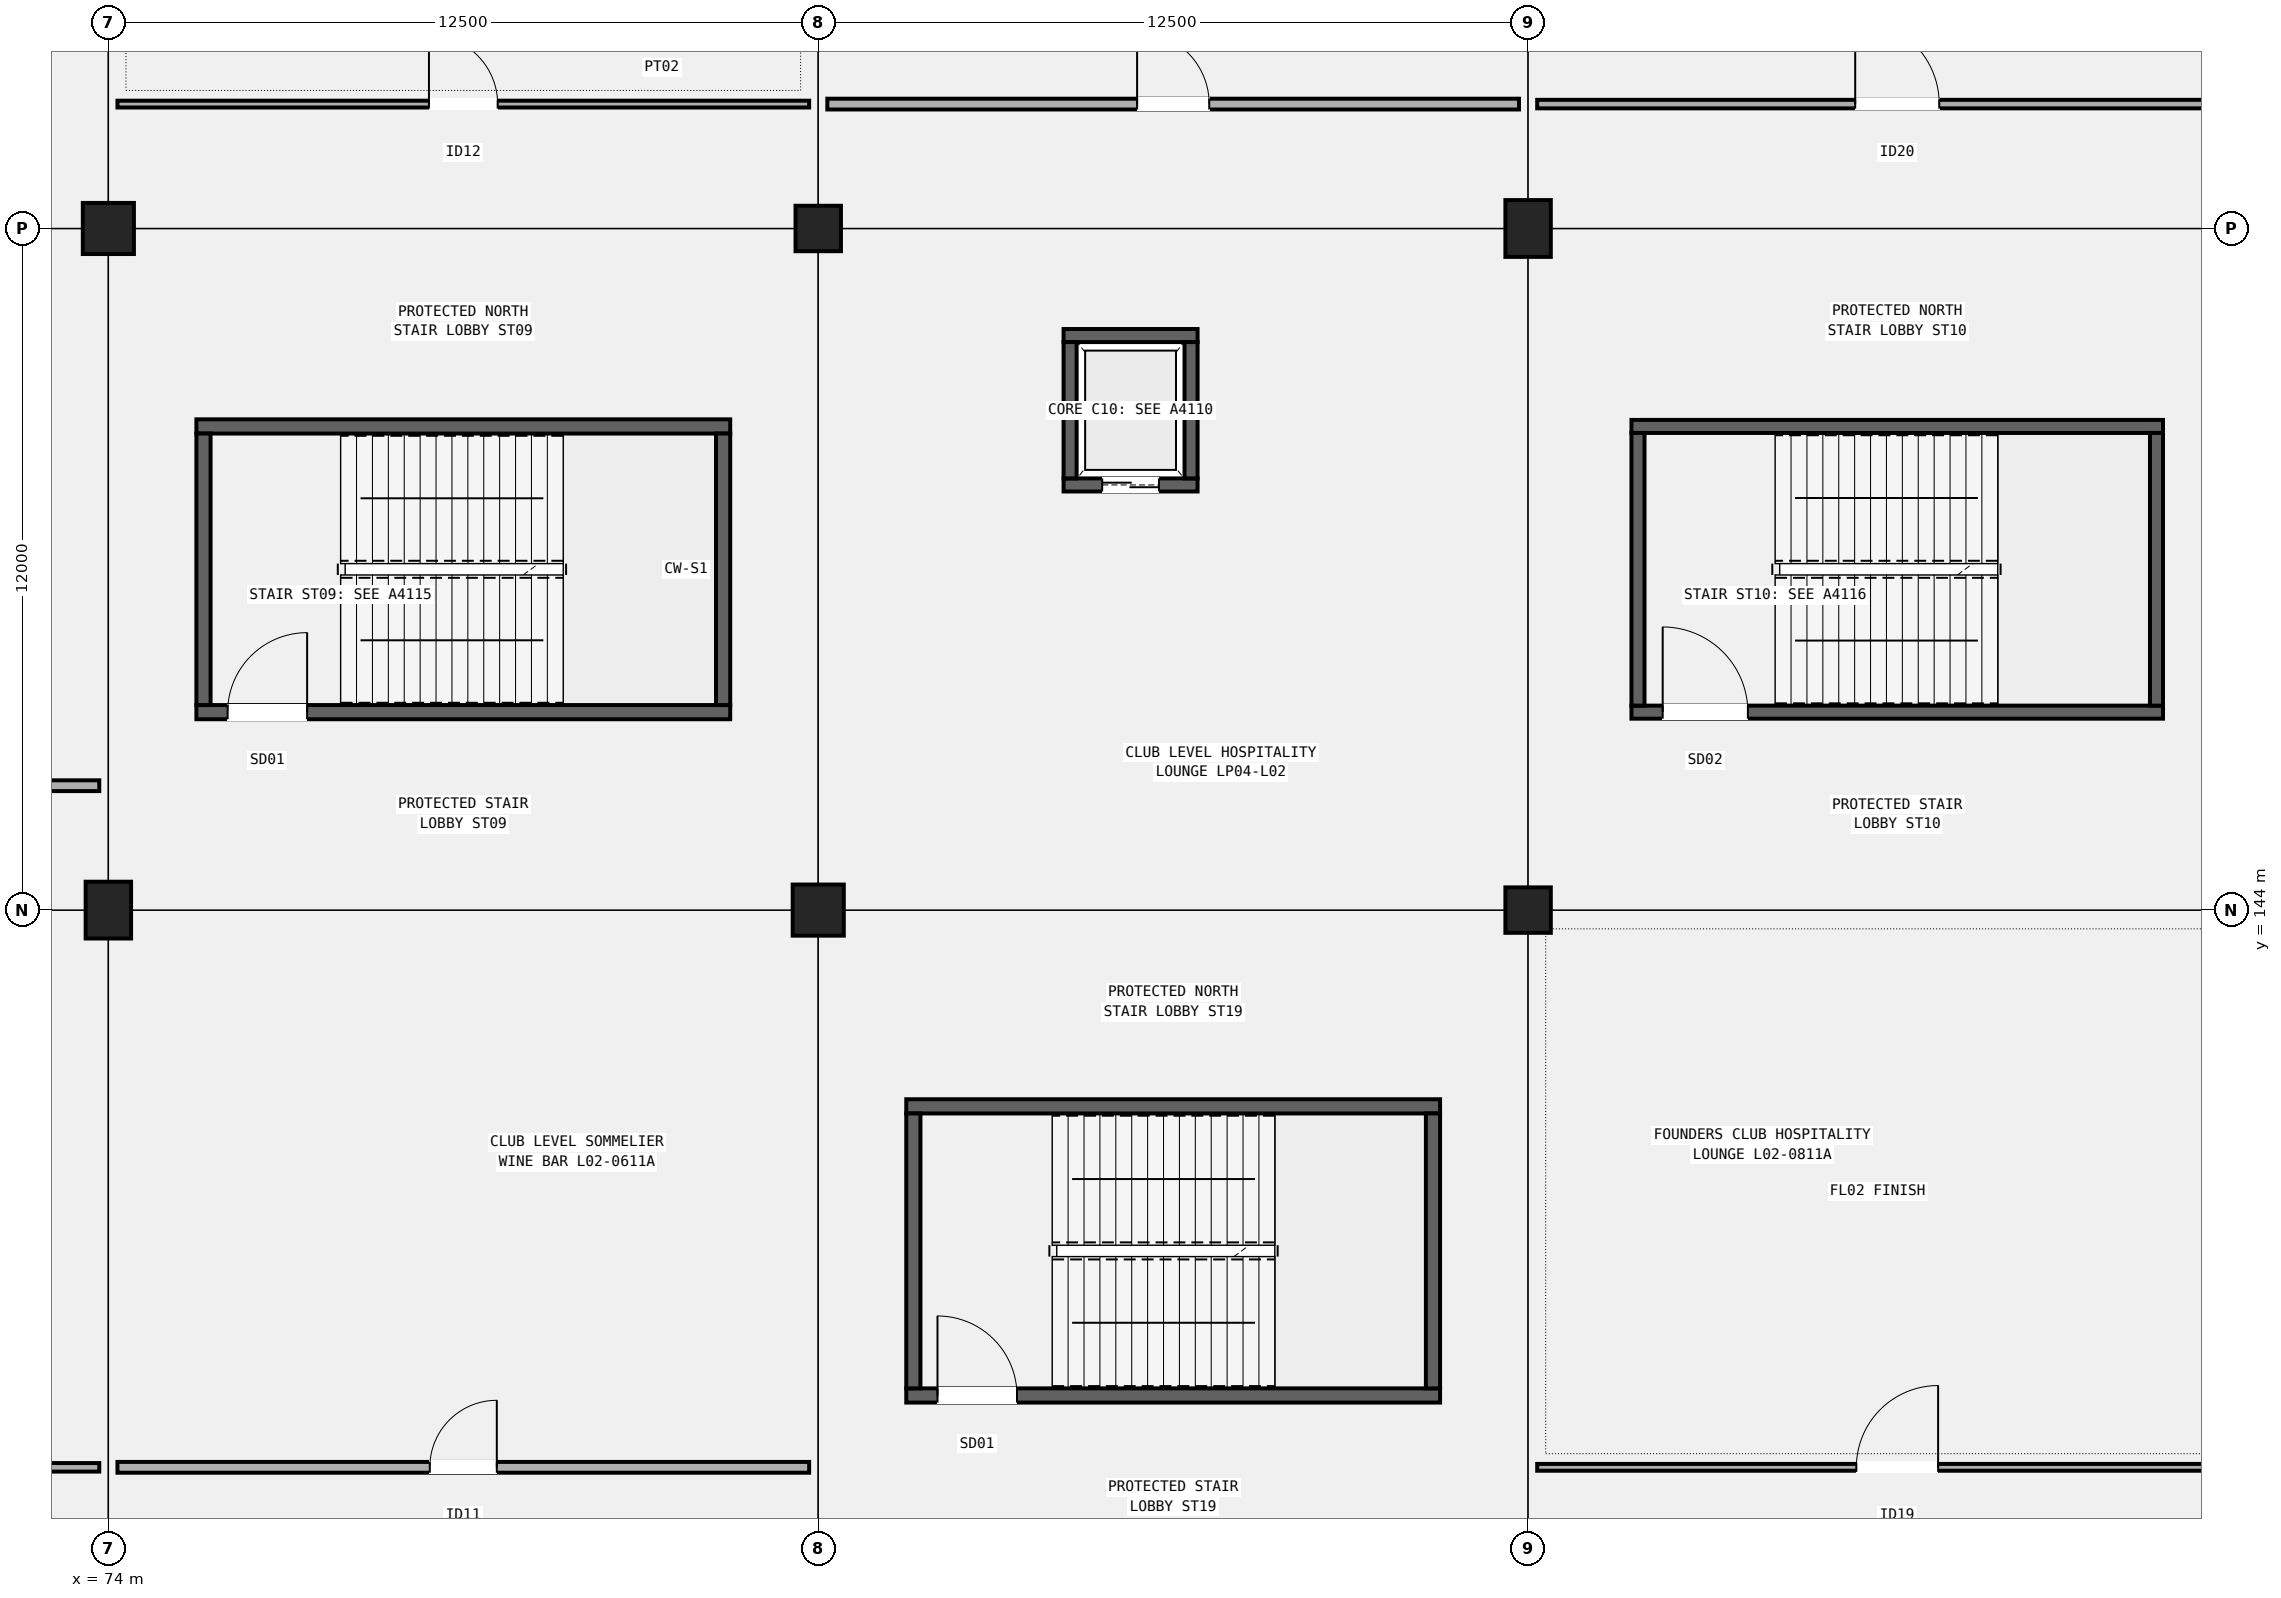
"""IFC4 building model, lengths in metres.
Left out: names, types, materials, properties, quantities, classifications, styles, units other than length and angle.
Written with IfcOpenShell. Run it as: python <this file> out.ifc"""

import sys

from ifc_helpers import new_model, si_unit, direction, frame, frame_2d, origin, origin_2d, place, context, subcontext, project, spatial, rectangle, extrude, element, fill, save


model = new_model("IFC4")
c1 = context("Model", 3, precision=1e-05, world=origin(), true_north=direction((0.0, 1.0)))
c2 = subcontext(c1, "Body", "Model", "MODEL_VIEW")
j1 = project(units=[si_unit("LENGTHUNIT", "METRE"), si_unit("PLANEANGLEUNIT", "RADIAN")], contexts=[c1])
p1 = place(None, origin())
s1 = spatial("IfcSite", under=j1, at=p1, CompositionType="ELEMENT")
p2 = place(p1, origin())
s2 = spatial("IfcBuilding", under=s1, at=p2, CompositionType="ELEMENT")
p3 = place(p2, frame((0.0, 0.0, 10.2)))
s3 = spatial("IfcBuildingStorey", under=s2, at=p3, CompositionType="ELEMENT", Elevation=10.2)
p4 = place(p3, frame((74.0, 144.0, 0.0), z_axis=(0.0, 0.0, 1.0), x_axis=(1.0, 0.0, 0.0)))
e1 = element("IfcColumn", 1, at=p4, inside=s3, PredefinedType="COLUMN", context=c2, shape_type="SweptSolid", body=[
    extrude(rectangle(XDim=0.8, YDim=1.0, at=origin_2d()), origin(), (0.0, 0.0, 1.0), 5.1),
])
for number, where, z_axis, x_axis in (
    (2, (74.0, 156.0, 0.0), (0.0, 0.0, 1.0), (1.0, 0.0, 0.0)),
    (3, (86.5, 144.0, 0.0), (0.0, 0.0, 1.0), (1.0, 0.0, 0.0)),
):
    element("IfcColumn", number, at=place(p3, frame(where, z_axis=z_axis, x_axis=x_axis)), inside=s3, PredefinedType="COLUMN", context=c2, shape_type="SweptSolid", body=[
        extrude(rectangle(XDim=0.9, YDim=0.9, at=origin_2d()), origin(), (0.0, 0.0, 1.0), 5.1),
    ])
for number, where, z_axis, x_axis in (
    (4, (86.5, 156.0, 0.0), (0.0, 0.0, 1.0), (1.0, 0.0, 0.0)),
    (5, (99.0, 144.0, 0.0), (0.0, 0.0, 1.0), (1.0, 0.0, 0.0)),
):
    element("IfcColumn", number, at=place(p3, frame(where, z_axis=z_axis, x_axis=x_axis)), inside=s3, PredefinedType="COLUMN", context=c2, shape_type="SweptSolid", body=[
        extrude(rectangle(XDim=0.8, YDim=0.8, at=origin_2d()), origin(), (0.0, 0.0, 1.0), 5.1),
    ])
p5 = place(p3, frame((99.0, 156.0, 0.0), z_axis=(0.0, 0.0, 1.0), x_axis=(1.0, 0.0, 0.0)))
e6 = element("IfcColumn", 6, at=p5, inside=s3, PredefinedType="COLUMN", context=c2, shape_type="SweptSolid", body=[
    extrude(rectangle(XDim=0.8, YDim=1.0, at=origin_2d()), origin(), (0.0, 0.0, 1.0), 5.1),
])
p6 = place(p3, frame((75.55, 147.485, 0.0), z_axis=(0.0, 0.0, 1.0), x_axis=(1.0, 0.0, 0.0)))
e7 = element("IfcWall", 7, at=p6, inside=s3, PredefinedType="SHEAR", context=c2, shape_type="SweptSolid", body=[
    extrude(rectangle(XDim=9.4, YDim=0.25, at=frame_2d((4.7, 0.0))), origin(), (0.0, 0.0, 1.0), 4.82),
])
p7 = place(p6, frame((0.55, 0.0, 0.0)))
e8 = element("IfcOpeningElement", 8, at=p7, cuts=e7, PredefinedType="OPENING", context=c2, shape_type="SweptSolid", body=[
    extrude(rectangle(XDim=1.4, YDim=2.15, at=frame_2d((0.7, 1.075))), frame((0.0, 0.135, 0.0), z_axis=(0.0, -1.0, 0.0), x_axis=(1.0, 0.0, 0.0)), (0.0, 0.0, 1.0), 0.27),
])
p8 = place(p3, frame((75.55, 152.515, 0.0), z_axis=(0.0, 0.0, 1.0), x_axis=(1.0, 0.0, 0.0)))
e9 = element("IfcWall", 9, at=p8, inside=s3, PredefinedType="SHEAR", context=c2, shape_type="SweptSolid", body=[
    extrude(rectangle(XDim=9.4, YDim=0.25, at=frame_2d((4.7, 0.0))), origin(), (0.0, 0.0, 1.0), 4.82),
])
for number, where, z_axis, x_axis in (
    (10, (75.675, 147.61, 0.0), (0.0, 0.0, 1.0), (0.0, 1.0, 0.0)),
    (11, (84.825, 147.61, 0.0), (0.0, 0.0, 1.0), (0.0, 1.0, 0.0)),
):
    element("IfcWall", number, at=place(p3, frame(where, z_axis=z_axis, x_axis=x_axis)), inside=s3, PredefinedType="SHEAR", context=c2, shape_type="SweptSolid", body=[
        extrude(rectangle(XDim=4.78, YDim=0.25, at=frame_2d((2.39, 0.0))), origin(), (0.0, 0.0, 1.0), 4.82),
    ])
p9 = place(p3, frame((100.82, 147.485, 0.0), z_axis=(0.0, 0.0, 1.0), x_axis=(1.0, 0.0, 0.0)))
e12 = element("IfcWall", 12, at=p9, inside=s3, PredefinedType="SHEAR", context=c2, shape_type="SweptSolid", body=[
    extrude(rectangle(XDim=9.36, YDim=0.23, at=frame_2d((4.68, 0.0))), origin(), (0.0, 0.0, 1.0), 4.82),
])
p10 = place(p9, frame((0.55, 0.0, 0.0)))
e13 = element("IfcOpeningElement", 13, at=p10, cuts=e12, PredefinedType="OPENING", context=c2, shape_type="SweptSolid", body=[
    extrude(rectangle(XDim=1.5, YDim=2.2, at=frame_2d((0.75, 1.1))), frame((0.0, 0.125, 0.0), z_axis=(0.0, -1.0, 0.0), x_axis=(1.0, 0.0, 0.0)), (0.0, 0.0, 1.0), 0.25),
])
p11 = place(p3, frame((100.82, 152.515, 0.0), z_axis=(0.0, 0.0, 1.0), x_axis=(1.0, 0.0, 0.0)))
e14 = element("IfcWall", 14, at=p11, inside=s3, PredefinedType="SHEAR", context=c2, shape_type="SweptSolid", body=[
    extrude(rectangle(XDim=9.36, YDim=0.23, at=frame_2d((4.68, 0.0))), origin(), (0.0, 0.0, 1.0), 4.82),
])
for number, where, z_axis, x_axis in (
    (15, (100.935, 147.6, 0.0), (0.0, 0.0, 1.0), (0.0, 1.0, 0.0)),
    (16, (110.065, 147.6, 0.0), (0.0, 0.0, 1.0), (0.0, 1.0, 0.0)),
):
    element("IfcWall", number, at=place(p3, frame(where, z_axis=z_axis, x_axis=x_axis)), inside=s3, PredefinedType="SHEAR", context=c2, shape_type="SweptSolid", body=[
        extrude(rectangle(XDim=4.8, YDim=0.23, at=frame_2d((2.4, 0.0))), origin(), (0.0, 0.0, 1.0), 4.82),
    ])
p12 = place(p3, frame((88.05, 135.455, 0.0), z_axis=(0.0, 0.0, 1.0), x_axis=(1.0, 0.0, 0.0)))
e17 = element("IfcWall", 17, at=p12, inside=s3, PredefinedType="SHEAR", context=c2, shape_type="SweptSolid", body=[
    extrude(rectangle(XDim=9.4, YDim=0.25, at=frame_2d((4.7, 0.0))), origin(), (0.0, 0.0, 1.0), 4.82),
])
p13 = place(p12, frame((0.55, 0.0, 0.0)))
e18 = element("IfcOpeningElement", 18, at=p13, cuts=e17, PredefinedType="OPENING", context=c2, shape_type="SweptSolid", body=[
    extrude(rectangle(XDim=1.4, YDim=2.15, at=frame_2d((0.7, 1.075))), frame((0.0, 0.135, 0.0), z_axis=(0.0, -1.0, 0.0), x_axis=(1.0, 0.0, 0.0)), (0.0, 0.0, 1.0), 0.27),
])
p14 = place(p3, frame((88.05, 140.545, 0.0), z_axis=(0.0, 0.0, 1.0), x_axis=(1.0, 0.0, 0.0)))
e19 = element("IfcWall", 19, at=p14, inside=s3, PredefinedType="SHEAR", context=c2, shape_type="SweptSolid", body=[
    extrude(rectangle(XDim=9.4, YDim=0.25, at=frame_2d((4.7, 0.0))), origin(), (0.0, 0.0, 1.0), 4.82),
])
for number, where, z_axis, x_axis in (
    (20, (88.175, 135.58, 0.0), (0.0, 0.0, 1.0), (0.0, 1.0, 0.0)),
    (21, (97.325, 135.58, 0.0), (0.0, 0.0, 1.0), (0.0, 1.0, 0.0)),
):
    element("IfcWall", number, at=place(p3, frame(where, z_axis=z_axis, x_axis=x_axis)), inside=s3, PredefinedType="SHEAR", context=c2, shape_type="SweptSolid", body=[
        extrude(rectangle(XDim=4.84, YDim=0.25, at=frame_2d((2.42, 0.0))), origin(), (0.0, 0.0, 1.0), 4.82),
    ])
p15 = place(p3, frame((90.82, 151.485, 0.0), z_axis=(0.0, 0.0, 1.0), x_axis=(1.0, 0.0, 0.0)))
e22 = element("IfcWall", 22, at=p15, inside=s3, PredefinedType="SHEAR", context=c2, shape_type="SweptSolid", body=[
    extrude(rectangle(XDim=2.36, YDim=0.23, at=frame_2d((1.18, 0.0))), origin(), (0.0, 0.0, 1.0), 4.82),
])
p16 = place(p15, frame((0.68, 0.0, 0.0)))
e23 = element("IfcOpeningElement", 23, at=p16, cuts=e22, PredefinedType="OPENING", context=c2, shape_type="SweptSolid", body=[
    extrude(rectangle(XDim=1.0, YDim=2.15, at=frame_2d((0.5, 1.075))), frame((0.0, 0.125, 0.0), z_axis=(0.0, -1.0, 0.0), x_axis=(1.0, 0.0, 0.0)), (0.0, 0.0, 1.0), 0.25),
])
p17 = place(p3, frame((90.82, 154.115, 0.0), z_axis=(0.0, 0.0, 1.0), x_axis=(1.0, 0.0, 0.0)))
e24 = element("IfcWall", 24, at=p17, inside=s3, PredefinedType="SHEAR", context=c2, shape_type="SweptSolid", body=[
    extrude(rectangle(XDim=2.36, YDim=0.23, at=frame_2d((1.18, 0.0))), origin(), (0.0, 0.0, 1.0), 4.82),
])
for number, where, z_axis, x_axis in (
    (25, (90.935, 151.6, 0.0), (0.0, 0.0, 1.0), (0.0, 1.0, 0.0)),
    (26, (93.065, 151.6, 0.0), (0.0, 0.0, 1.0), (0.0, 1.0, 0.0)),
):
    element("IfcWall", number, at=place(p3, frame(where, z_axis=z_axis, x_axis=x_axis)), inside=s3, PredefinedType="SHEAR", context=c2, shape_type="SweptSolid", body=[
        extrude(rectangle(XDim=2.4, YDim=0.23, at=frame_2d((1.2, 0.0))), origin(), (0.0, 0.0, 1.0), 4.82),
    ])
p18 = place(p3, frame((61.66, 134.19, 0.0), z_axis=(0.0, 0.0, 1.0), x_axis=(1.0, 0.0, 0.0)))
e27 = element("IfcWall", 27, at=p18, inside=s3, PredefinedType="PARTITIONING", context=c2, shape_type="SweptSolid", body=[
    extrude(rectangle(XDim=12.18, YDim=0.15, at=frame_2d((6.09, 0.0))), origin(), (0.0, 0.0, 1.0), 4.22),
])
p19 = place(p18, frame((5.56, 0.0, 0.0)))
e28 = element("IfcOpeningElement", 28, at=p19, cuts=e27, PredefinedType="OPENING", context=c2, shape_type="SweptSolid", body=[
    extrude(rectangle(XDim=1.06, YDim=2.15, at=frame_2d((0.53, 1.075))), frame((0.0, 0.085, 0.0), z_axis=(0.0, -1.0, 0.0), x_axis=(1.0, 0.0, 0.0)), (0.0, 0.0, 1.0), 0.17),
])
p20 = place(p3, frame((61.66, 146.19, 0.0), z_axis=(0.0, 0.0, 1.0), x_axis=(1.0, 0.0, 0.0)))
e29 = element("IfcWall", 29, at=p20, inside=s3, PredefinedType="PARTITIONING", context=c2, shape_type="SweptSolid", body=[
    extrude(rectangle(XDim=12.18, YDim=0.19, at=frame_2d((6.09, 0.0))), origin(), (0.0, 0.0, 1.0), 4.22),
])
p21 = place(p20, frame((5.545, 0.0, 0.0)))
e30 = element("IfcOpeningElement", 30, at=p21, cuts=e29, PredefinedType="OPENING", context=c2, shape_type="SweptSolid", body=[
    extrude(rectangle(XDim=1.09, YDim=2.16, at=frame_2d((0.545, 1.08))), frame((0.0, 0.105, 0.0), z_axis=(0.0, -1.0, 0.0), x_axis=(1.0, 0.0, 0.0)), (0.0, 0.0, 1.0), 0.21),
])
p22 = place(p3, frame((74.16, 134.19, 0.0), z_axis=(0.0, 0.0, 1.0), x_axis=(1.0, 0.0, 0.0)))
e31 = element("IfcWall", 31, at=p22, inside=s3, PredefinedType="PARTITIONING", context=c2, shape_type="SweptSolid", body=[
    extrude(rectangle(XDim=12.18, YDim=0.19, at=frame_2d((6.09, 0.0))), origin(), (0.0, 0.0, 1.0), 4.22),
])
p23 = place(p22, frame((5.5, 0.0, 0.0)))
e32 = element("IfcOpeningElement", 32, at=p23, cuts=e31, PredefinedType="OPENING", context=c2, shape_type="SweptSolid", body=[
    extrude(rectangle(XDim=1.18, YDim=2.2, at=frame_2d((0.59, 1.1))), frame((0.0, 0.105, 0.0), z_axis=(0.0, -1.0, 0.0), x_axis=(1.0, 0.0, 0.0)), (0.0, 0.0, 1.0), 0.21),
])
p24 = place(p3, frame((74.16, 158.19, 0.0), z_axis=(0.0, 0.0, 1.0), x_axis=(1.0, 0.0, 0.0)))
e33 = element("IfcWall", 33, at=p24, inside=s3, PredefinedType="PARTITIONING", context=c2, shape_type="SweptSolid", body=[
    extrude(rectangle(XDim=12.18, YDim=0.12, at=frame_2d((6.09, 0.0))), origin(), (0.0, 0.0, 1.0), 4.22),
])
p25 = place(p24, frame((5.485, 0.0, 0.0)))
e34 = element("IfcOpeningElement", 34, at=p25, cuts=e33, PredefinedType="OPENING", context=c2, shape_type="SweptSolid", body=[
    extrude(rectangle(XDim=1.21, YDim=2.18, at=frame_2d((0.605, 1.09))), frame((0.0, 0.07, 0.0), z_axis=(0.0, -1.0, 0.0), x_axis=(1.0, 0.0, 0.0)), (0.0, 0.0, 1.0), 0.14),
])
p26 = place(p3, frame((86.66, 158.19, 0.0), z_axis=(0.0, 0.0, 1.0), x_axis=(1.0, 0.0, 0.0)))
e35 = element("IfcWall", 35, at=p26, inside=s3, PredefinedType="PARTITIONING", context=c2, shape_type="SweptSolid", body=[
    extrude(rectangle(XDim=12.18, YDim=0.19, at=frame_2d((6.09, 0.0))), origin(), (0.0, 0.0, 1.0), 4.22),
])
p27 = place(p26, frame((5.455, 0.0, 0.0)))
e36 = element("IfcOpeningElement", 36, at=p27, cuts=e35, PredefinedType="OPENING", context=c2, shape_type="SweptSolid", body=[
    extrude(rectangle(XDim=1.27, YDim=2.2, at=frame_2d((0.635, 1.1))), frame((0.0, 0.105, 0.0), z_axis=(0.0, -1.0, 0.0), x_axis=(1.0, 0.0, 0.0)), (0.0, 0.0, 1.0), 0.21),
])
p28 = place(p3, frame((99.16, 134.19, 0.0), z_axis=(0.0, 0.0, 1.0), x_axis=(1.0, 0.0, 0.0)))
e37 = element("IfcWall", 37, at=p28, inside=s3, PredefinedType="PARTITIONING", context=c2, shape_type="SweptSolid", body=[
    extrude(rectangle(XDim=12.68, YDim=0.12, at=frame_2d((6.34, 0.0))), origin(), (0.0, 0.0, 1.0), 4.22),
])
p29 = place(p28, frame((5.62, 0.0, 0.0)))
e38 = element("IfcOpeningElement", 38, at=p29, cuts=e37, PredefinedType="OPENING", context=c2, shape_type="SweptSolid", body=[
    extrude(rectangle(XDim=1.44, YDim=2.26, at=frame_2d((0.72, 1.13))), frame((0.0, 0.07, 0.0), z_axis=(0.0, -1.0, 0.0), x_axis=(1.0, 0.0, 0.0)), (0.0, 0.0, 1.0), 0.14),
])
p30 = place(p3, frame((99.16, 158.19, 0.0), z_axis=(0.0, 0.0, 1.0), x_axis=(1.0, 0.0, 0.0)))
e39 = element("IfcWall", 39, at=p30, inside=s3, PredefinedType="PARTITIONING", context=c2, shape_type="SweptSolid", body=[
    extrude(rectangle(XDim=12.68, YDim=0.15, at=frame_2d((6.34, 0.0))), origin(), (0.0, 0.0, 1.0), 4.22),
])
p31 = place(p30, frame((5.6, 0.0, 0.0)))
e40 = element("IfcOpeningElement", 40, at=p31, cuts=e39, PredefinedType="OPENING", context=c2, shape_type="SweptSolid", body=[
    extrude(rectangle(XDim=1.48, YDim=2.24, at=frame_2d((0.74, 1.12))), frame((0.0, 0.085, 0.0), z_axis=(0.0, -1.0, 0.0), x_axis=(1.0, 0.0, 0.0)), (0.0, 0.0, 1.0), 0.17),
])
p32 = place(p7, origin())
e41 = element("IfcDoor", 41, at=p32, inside=s3, OperationType="SINGLE_SWING_RIGHT", PredefinedType="DOOR", context=c2, shape_type="SweptSolid", body=[
    extrude(rectangle(XDim=1.4, YDim=2.15, at=frame_2d((0.7, 1.075))), frame((0.0, 0.025, 0.0), z_axis=(0.0, -1.0, 0.0), x_axis=(1.0, 0.0, 0.0)), (0.0, 0.0, 1.0), 0.05),
])
fill(e8, e41)
p33 = place(p10, origin())
e42 = element("IfcDoor", 42, at=p33, inside=s3, OperationType="SINGLE_SWING_LEFT", PredefinedType="DOOR", context=c2, shape_type="SweptSolid", body=[
    extrude(rectangle(XDim=1.5, YDim=2.2, at=frame_2d((0.75, 1.1))), frame((0.0, 0.025, 0.0), z_axis=(0.0, -1.0, 0.0), x_axis=(1.0, 0.0, 0.0)), (0.0, 0.0, 1.0), 0.05),
])
fill(e13, e42)
p34 = place(p13, origin())
e43 = element("IfcDoor", 43, at=p34, inside=s3, OperationType="SINGLE_SWING_LEFT", PredefinedType="DOOR", context=c2, shape_type="SweptSolid", body=[
    extrude(rectangle(XDim=1.4, YDim=2.15, at=frame_2d((0.7, 1.075))), frame((0.0, 0.025, 0.0), z_axis=(0.0, -1.0, 0.0), x_axis=(1.0, 0.0, 0.0)), (0.0, 0.0, 1.0), 0.05),
])
fill(e18, e43)
p35 = place(p16, origin())
e44 = element("IfcDoor", 44, at=p35, inside=s3, OperationType="DOUBLE_DOOR_SLIDING", PredefinedType="DOOR", context=c2, shape_type="SweptSolid", body=[
    extrude(rectangle(XDim=1.0, YDim=2.15, at=frame_2d((0.5, 1.075))), frame((0.0, 0.025, 0.0), z_axis=(0.0, -1.0, 0.0), x_axis=(1.0, 0.0, 0.0)), (0.0, 0.0, 1.0), 0.05),
])
fill(e23, e44)
p36 = place(p23, origin())
e45 = element("IfcDoor", 45, at=p36, inside=s3, OperationType="SINGLE_SWING_RIGHT", PredefinedType="DOOR", context=c2, shape_type="SweptSolid", body=[
    extrude(rectangle(XDim=1.18, YDim=2.2, at=frame_2d((0.59, 1.1))), frame((0.0, 0.025, 0.0), z_axis=(0.0, -1.0, 0.0), x_axis=(1.0, 0.0, 0.0)), (0.0, 0.0, 1.0), 0.05),
])
fill(e32, e45)
p37 = place(p25, origin())
e46 = element("IfcDoor", 46, at=p37, inside=s3, OperationType="SINGLE_SWING_LEFT", PredefinedType="DOOR", context=c2, shape_type="SweptSolid", body=[
    extrude(rectangle(XDim=1.21, YDim=2.18, at=frame_2d((0.605, 1.09))), frame((0.0, 0.025, 0.0), z_axis=(0.0, -1.0, 0.0), x_axis=(1.0, 0.0, 0.0)), (0.0, 0.0, 1.0), 0.05),
])
fill(e34, e46)
p38 = place(p27, origin())
e47 = element("IfcDoor", 47, at=p38, inside=s3, OperationType="SINGLE_SWING_LEFT", PredefinedType="DOOR", context=c2, shape_type="SweptSolid", body=[
    extrude(rectangle(XDim=1.27, YDim=2.2, at=frame_2d((0.635, 1.1))), frame((0.0, 0.025, 0.0), z_axis=(0.0, -1.0, 0.0), x_axis=(1.0, 0.0, 0.0)), (0.0, 0.0, 1.0), 0.05),
])
fill(e36, e47)
p39 = place(p29, origin())
e48 = element("IfcDoor", 48, at=p39, inside=s3, OperationType="SINGLE_SWING_RIGHT", PredefinedType="DOOR", context=c2, shape_type="SweptSolid", body=[
    extrude(rectangle(XDim=1.44, YDim=2.26, at=frame_2d((0.72, 1.13))), frame((0.0, 0.025, 0.0), z_axis=(0.0, -1.0, 0.0), x_axis=(1.0, 0.0, 0.0)), (0.0, 0.0, 1.0), 0.05),
])
fill(e38, e48)
p40 = place(p31, origin())
e49 = element("IfcDoor", 49, at=p40, inside=s3, OperationType="SINGLE_SWING_LEFT", PredefinedType="DOOR", context=c2, shape_type="SweptSolid", body=[
    extrude(rectangle(XDim=1.48, YDim=2.24, at=frame_2d((0.74, 1.12))), frame((0.0, 0.025, 0.0), z_axis=(0.0, -1.0, 0.0), x_axis=(1.0, 0.0, 0.0)), (0.0, 0.0, 1.0), 0.05),
])
fill(e40, e49)
save(model, sys.argv[1])
